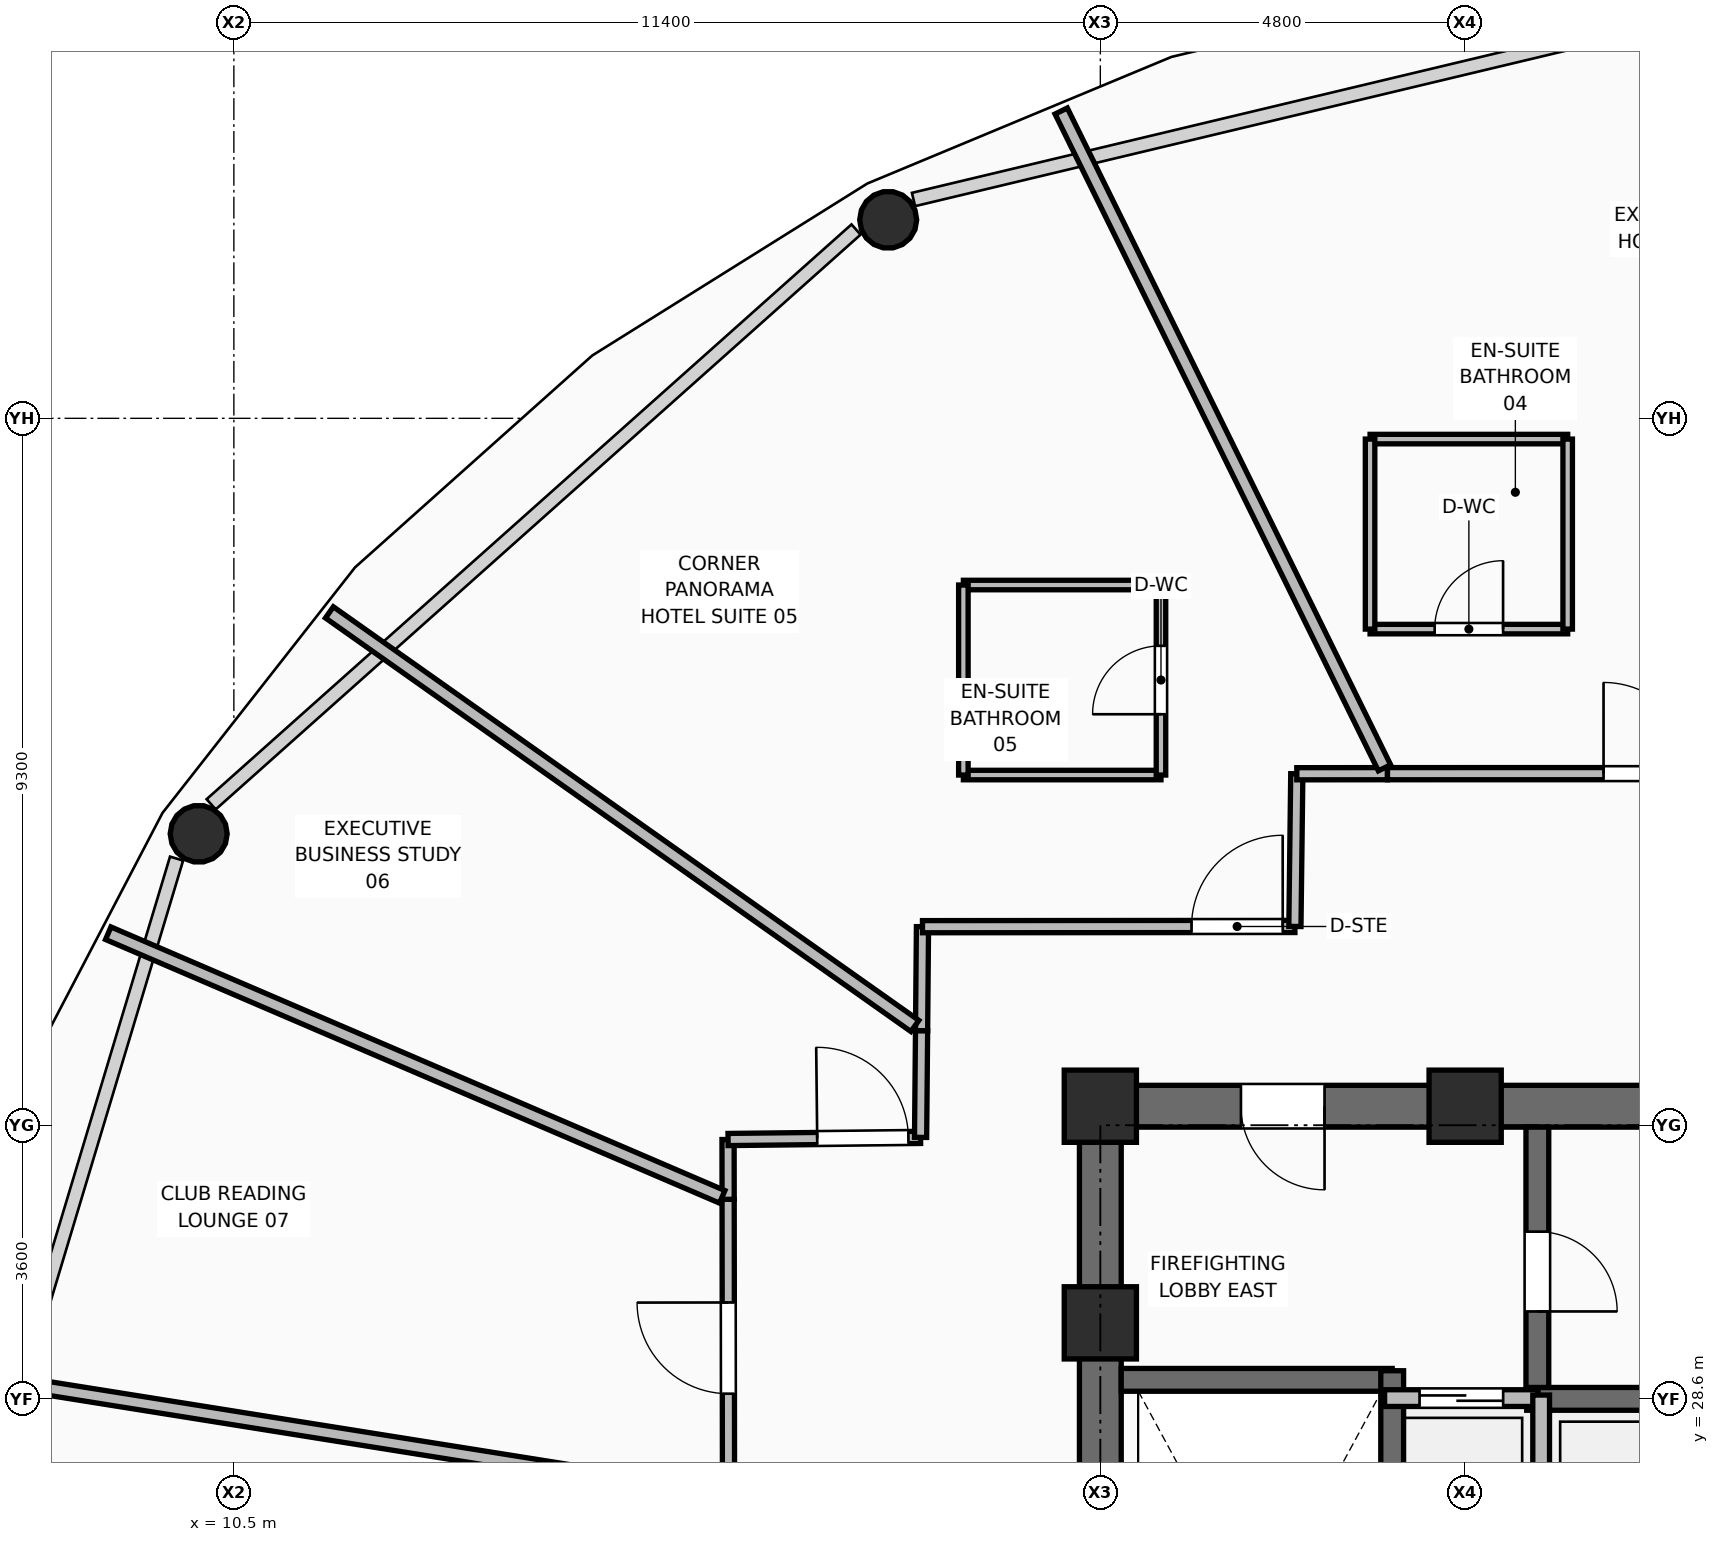
"""IFC4 building model, lengths in metres.
Left out: names, types, materials, properties, quantities, classifications, styles, units other than length and angle.
Written with IfcOpenShell. Run it as: python <this file> out.ifc"""

import sys

from ifc_helpers import new_model, si_unit, direction, frame, frame_2d, origin, origin_2d, place, context, subcontext, project, spatial, rectangle, hollow_circle, extrude, element, fill, save


model = new_model("IFC4")
c1 = context("Model", 3, precision=1e-05, world=origin(), true_north=direction((0.0, 1.0)))
c2 = subcontext(c1, "Body", "Model", "MODEL_VIEW")
j1 = project(units=[si_unit("LENGTHUNIT", "METRE"), si_unit("PLANEANGLEUNIT", "RADIAN")], contexts=[c1])
p1 = place(None, origin())
s1 = spatial("IfcSite", under=j1, at=p1, CompositionType="ELEMENT")
p2 = place(p1, origin())
s2 = spatial("IfcBuilding", under=s1, at=p2, CompositionType="ELEMENT")
p3 = place(p2, frame((0.0, 0.0, 157.2)))
s3 = spatial("IfcBuildingStorey", under=s2, at=p3, CompositionType="ELEMENT", Elevation=157.2)
for number, where, z_axis, x_axis in (
    (1, (21.9, 29.6, 0.0), (0.0, 0.0, 1.0), (1.0, 0.0, 0.0)),
    (2, (21.9, 32.45, 0.0), (0.0, 0.0, 1.0), (1.0, 0.0, 0.0)),
    (3, (26.7, 32.45, 0.0), (0.0, 0.0, 1.0), (1.0, 0.0, 0.0)),
):
    element("IfcColumn", number, at=place(p3, frame(where, z_axis=z_axis, x_axis=x_axis)), inside=s3, PredefinedType="COLUMN", context=c2, shape_type="SweptSolid", body=[
        extrude(rectangle(XDim=0.95, YDim=0.95, at=origin_2d()), origin(), (0.0, 0.0, 1.0), 3.75),
    ])
for number, where, z_axis, x_axis in (
    (4, (19.109, 44.112, 0.0), (0.0, 0.0, 1.0), (1.0, 0.0, 0.0)),
    (5, (10.037, 36.034, 0.0), (0.0, 0.0, 1.0), (1.0, 0.0, 0.0)),
):
    element("IfcColumn", number, at=place(p3, frame(where, z_axis=z_axis, x_axis=x_axis)), inside=s3, PredefinedType="COLUMN", context=c2, shape_type="SweptSolid", body=[
        extrude(hollow_circle(Radius=0.375, WallThickness=0.035, at=origin_2d()), origin(), (0.0, 0.0, 1.0), 3.57),
    ])
p4 = place(p3, frame((21.625, 32.45, 0.0), z_axis=(0.0, 0.0, 1.0), x_axis=(1.0, 0.0, 0.0)))
e6 = element("IfcWall", 6, at=p4, inside=s3, PredefinedType="SHEAR", context=c2, shape_type="SweptSolid", body=[
    extrude(rectangle(XDim=19.75, YDim=0.55, at=frame_2d((9.875, 0.0))), origin(), (0.0, 0.0, 1.0), 3.57),
])
p5 = place(p4, frame((2.125, 0.0, 0.0)))
e7 = element("IfcOpeningElement", 7, at=p5, cuts=e6, PredefinedType="OPENING", context=c2, shape_type="SweptSolid", body=[
    extrude(rectangle(XDim=1.1, YDim=2.1, at=frame_2d((0.55, 1.05))), frame((0.0, 0.285, 0.0), z_axis=(0.0, -1.0, 0.0), x_axis=(1.0, 0.0, 0.0)), (0.0, 0.0, 1.0), 0.57),
])
p6 = place(p4, frame((15.515, 0.0, 0.0)))
e8 = element("IfcOpeningElement", 8, at=p6, cuts=e6, PredefinedType="OPENING", context=c2, shape_type="SweptSolid", body=[
    extrude(rectangle(XDim=1.0, YDim=2.1, at=frame_2d((0.5, 1.05))), frame((0.0, 0.285, 0.0), z_axis=(0.0, -1.0, 0.0), x_axis=(1.0, 0.0, 0.0)), (0.0, 0.0, 1.0), 0.57),
])
p7 = place(p4, frame((17.525, 0.0, 0.0)))
e9 = element("IfcOpeningElement", 9, at=p7, cuts=e6, PredefinedType="OPENING", context=c2, shape_type="SweptSolid", body=[
    extrude(rectangle(XDim=0.9, YDim=2.1, at=frame_2d((0.45, 1.05))), frame((0.0, 0.285, 0.0), z_axis=(0.0, -1.0, 0.0), x_axis=(1.0, 0.0, 0.0)), (0.0, 0.0, 1.0), 0.57),
])
p8 = place(p3, frame((21.9, 18.075, 0.0), z_axis=(0.0, 0.0, 1.0), x_axis=(0.0, 1.0, 0.0)))
e10 = element("IfcWall", 10, at=p8, inside=s3, PredefinedType="SHEAR", context=c2, shape_type="SweptSolid", body=[
    extrude(rectangle(XDim=14.1, YDim=0.55, at=frame_2d((7.05, 0.0))), origin(), (0.0, 0.0, 1.0), 3.57),
])
p9 = place(p3, frame((22.175, 28.85, 0.0), z_axis=(0.0, 0.0, 1.0), x_axis=(1.0, 0.0, 0.0)))
e11 = element("IfcWall", 11, at=p9, inside=s3, PredefinedType="SHEAR", context=c2, shape_type="SweptSolid", body=[
    extrude(rectangle(XDim=3.565, YDim=0.3, at=frame_2d((1.782, 0.0))), origin(), (0.0, 0.0, 1.0), 3.57),
])
p10 = place(p3, frame((25.74, 20.98, 0.0), z_axis=(0.0, 0.0, 1.0), x_axis=(0.0, 1.0, 0.0)))
e12 = element("IfcWall", 12, at=p10, inside=s3, PredefinedType="SHEAR", context=c2, shape_type="SweptSolid", body=[
    extrude(rectangle(XDim=7.99, YDim=0.3, at=frame_2d((3.995, 0.0))), origin(), (0.0, 0.0, 1.0), 3.57),
])
p11 = place(p3, frame((27.51, 28.6, 0.0), z_axis=(0.0, 0.0, 1.0), x_axis=(1.0, 0.0, 0.0)))
e13 = element("IfcWall", 13, at=p11, inside=s3, PredefinedType="SHEAR", context=c2, shape_type="SweptSolid", body=[
    extrude(rectangle(XDim=8.03, YDim=0.3, at=frame_2d((4.015, 0.0))), origin(), (0.0, 0.0, 1.0), 3.57),
])
p12 = place(p3, frame((27.65, 28.75, 0.0), z_axis=(0.0, 0.0, 1.0), x_axis=(0.0, 1.0, 0.0)))
e14 = element("IfcWall", 14, at=p12, inside=s3, PredefinedType="SHEAR", context=c2, shape_type="SweptSolid", body=[
    extrude(rectangle(XDim=3.425, YDim=0.3, at=frame_2d((1.712, 0.0))), origin(), (0.0, 0.0, 1.0), 3.57),
])
p13 = place(p12, frame((1.0, 0.0, 0.0)))
e15 = element("IfcOpeningElement", 15, at=p13, cuts=e14, PredefinedType="OPENING", context=c2, shape_type="SweptSolid", body=[
    extrude(rectangle(XDim=1.05, YDim=2.1, at=frame_2d((0.525, 1.05))), frame((0.0, 0.16, 0.0), z_axis=(0.0, -1.0, 0.0), x_axis=(1.0, 0.0, 0.0)), (0.0, 0.0, 1.0), 0.32),
])
p14 = place(p3, frame((25.64, 28.61, 0.0), z_axis=(0.0, 0.0, 1.0), x_axis=(1.0, 0.0, 0.0)))
e16 = element("IfcWall", 16, at=p14, inside=s3, PredefinedType="PARTITIONING", context=c2, shape_type="SweptSolid", body=[
    extrude(rectangle(XDim=2.02, YDim=0.22, at=frame_2d((1.01, 0.0))), origin(), (0.0, 0.0, 1.0), 3.55),
])
p15 = place(p14, frame((0.46, 0.0, 0.0)))
e17 = element("IfcOpeningElement", 17, at=p15, cuts=e16, PredefinedType="OPENING", context=c2, shape_type="SweptSolid", body=[
    extrude(rectangle(XDim=1.1, YDim=2.2, at=frame_2d((0.55, 1.1))), frame((0.0, 0.12, 0.0), z_axis=(0.0, -1.0, 0.0), x_axis=(1.0, 0.0, 0.0)), (0.0, 0.0, 1.0), 0.24),
])
p16 = place(p3, frame((27.7, 25.65, 0.0), z_axis=(0.0, 0.0, 1.0), x_axis=(0.0, 1.0, 0.0)))
e18 = element("IfcWall", 18, at=p16, inside=s3, PredefinedType="PARTITIONING", context=c2, shape_type="SweptSolid", body=[
    extrude(rectangle(XDim=3.0, YDim=0.22, at=frame_2d((1.5, 0.0))), origin(), (0.0, 0.0, 1.0), 3.55),
])
p17 = place(p3, frame((17.008, 27.311, 0.0), z_axis=(0.0, 0.0, 1.0), x_axis=(-0.001309879116, 0.999999142108, 0.0)))
e19 = element("IfcWall", 19, at=p17, inside=s3, PredefinedType="PARTITIONING", context=c2, shape_type="SweptSolid", body=[
    extrude(rectangle(XDim=3.914, YDim=0.16, at=frame_2d((1.957, 0.0))), origin(), (0.0, 0.0, 1.0), 3.55),
])
p18 = place(p17, frame((1.357, 0.0, 0.0)))
e20 = element("IfcOpeningElement", 20, at=p18, cuts=e19, PredefinedType="OPENING", context=c2, shape_type="SweptSolid", body=[
    extrude(rectangle(XDim=1.2, YDim=2.1, at=frame_2d((0.6, 1.05))), frame((0.0, 0.09, 0.0), z_axis=(0.0, -1.0, 0.0), x_axis=(1.0, 0.0, 0.0)), (0.0, 0.0, 1.0), 0.18),
])
p19 = place(p3, frame((17.003, 31.225, 0.0), z_axis=(0.0, 0.0, 1.0), x_axis=(-0.001241078784, 0.999999229861, 0.0)))
e21 = element("IfcWall", 21, at=p19, inside=s3, PredefinedType="PARTITIONING", context=c2, shape_type="SweptSolid", body=[
    extrude(rectangle(XDim=0.787, YDim=0.16, at=frame_2d((0.394, 0.0))), origin(), (0.0, 0.0, 1.0), 3.55),
])
p20 = place(p3, frame((17.002, 32.012, 0.0), z_axis=(0.0, 0.0, 1.0), x_axis=(0.999938574393, 0.011083656487, 0.0)))
e22 = element("IfcWall", 22, at=p20, inside=s3, PredefinedType="PARTITIONING", context=c2, shape_type="SweptSolid", body=[
    extrude(rectangle(XDim=2.533, YDim=0.16, at=frame_2d((1.267, 0.0))), origin(), (0.0, 0.0, 1.0), 3.55),
])
p21 = place(p20, frame((1.173, 0.0, 0.0)))
e23 = element("IfcOpeningElement", 23, at=p21, cuts=e22, PredefinedType="OPENING", context=c2, shape_type="SweptSolid", body=[
    extrude(rectangle(XDim=1.2, YDim=2.1, at=frame_2d((0.6, 1.05))), frame((0.0, 0.09, 0.0), z_axis=(0.0, -1.0, 0.0), x_axis=(1.0, 0.0, 0.0)), (0.0, 0.0, 1.0), 0.18),
])
p22 = place(p3, frame((19.535, 32.04, 0.0), z_axis=(0.0, 0.0, 1.0), x_axis=(0.009389257464, 0.999955919951, 0.0)))
e24 = element("IfcWall", 24, at=p22, inside=s3, PredefinedType="PARTITIONING", context=c2, shape_type="SweptSolid", body=[
    extrude(rectangle(XDim=1.404, YDim=0.16, at=frame_2d((0.702, 0.0))), origin(), (0.0, 0.0, 1.0), 3.006),
])
p23 = place(p3, frame((19.548, 33.444, 0.0), z_axis=(0.0, 0.0, 1.0), x_axis=(0.008744980606, 0.999961761926, 0.0)))
e25 = element("IfcWall", 25, at=p23, inside=s3, PredefinedType="PARTITIONING", context=c2, shape_type="SweptSolid", body=[
    extrude(rectangle(XDim=1.368, YDim=0.16, at=frame_2d((0.684, 0.0))), origin(), (0.0, 0.0, 1.0), 3.55),
])
p24 = place(p3, frame((19.56, 34.812, 0.0), z_axis=(0.0, 0.0, 1.0), x_axis=(0.999999821253, 0.000597907217, 0.0)))
e26 = element("IfcWall", 26, at=p24, inside=s3, PredefinedType="PARTITIONING", context=c2, shape_type="SweptSolid", body=[
    extrude(rectangle(XDim=4.9, YDim=0.16, at=frame_2d((2.45, 0.0))), origin(), (0.0, 0.0, 1.0), 3.006),
])
p25 = place(p24, frame((3.54, 0.0, 0.0)))
e27 = element("IfcOpeningElement", 27, at=p25, cuts=e26, PredefinedType="OPENING", context=c2, shape_type="SweptSolid", body=[
    extrude(rectangle(XDim=1.2, YDim=2.1, at=frame_2d((0.6, 1.05))), frame((0.0, 0.09, 0.0), z_axis=(0.0, -1.0, 0.0), x_axis=(1.0, 0.0, 0.0)), (0.0, 0.0, 1.0), 0.18),
])
p26 = place(p3, frame((24.46, 34.815, 0.0), z_axis=(0.0, 0.0, 1.0), x_axis=(0.01251572883, 0.999921675199, 0.0)))
e28 = element("IfcWall", 28, at=p26, inside=s3, PredefinedType="PARTITIONING", context=c2, shape_type="SweptSolid", body=[
    extrude(rectangle(XDim=2.009, YDim=0.16, at=frame_2d((1.005, 0.0))), origin(), (0.0, 0.0, 1.0), 3.55),
])
p27 = place(p3, frame((24.485, 36.824, 0.0), z_axis=(0.0, 0.0, 1.0), x_axis=(0.999999664894, 0.000818665301, 0.0)))
e29 = element("IfcWall", 29, at=p27, inside=s3, PredefinedType="PARTITIONING", context=c2, shape_type="SweptSolid", body=[
    extrude(rectangle(XDim=1.193, YDim=0.16, at=frame_2d((0.596, 0.0))), origin(), (0.0, 0.0, 1.0), 3.55),
])
p28 = place(p3, frame((25.678, 36.825, 0.0), z_axis=(0.0, 0.0, 1.0), x_axis=(0.999999989491, 0.000144974809, 0.0)))
e30 = element("IfcWall", 30, at=p28, inside=s3, PredefinedType="PARTITIONING", context=c2, shape_type="SweptSolid", body=[
    extrude(rectangle(XDim=6.736, YDim=0.16, at=frame_2d((3.368, 0.0))), origin(), (0.0, 0.0, 1.0), 3.006),
])
p29 = place(p28, frame((2.843, 0.0, 0.0)))
e31 = element("IfcOpeningElement", 31, at=p29, cuts=e30, PredefinedType="OPENING", context=c2, shape_type="SweptSolid", body=[
    extrude(rectangle(XDim=1.2, YDim=2.1, at=frame_2d((0.6, 1.05))), frame((0.0, 0.09, 0.0), z_axis=(0.0, -1.0, 0.0), x_axis=(1.0, 0.0, 0.0)), (0.0, 0.0, 1.0), 0.18),
])
p30 = place(p3, frame((25.639, 36.902, 0.0), z_axis=(0.0, 0.0, 1.0), x_axis=(-0.44167900267, 0.897173148617, 0.0)))
e32 = element("IfcWall", 32, at=p30, inside=s3, PredefinedType="PARTITIONING", context=c2, shape_type="SweptSolid", body=[
    extrude(rectangle(XDim=9.631, YDim=0.18, at=frame_2d((4.815, 0.0))), origin(), (0.0, 0.0, 1.0), 2.852),
])
p31 = place(p3, frame((19.46, 33.506, 0.0), z_axis=(0.0, 0.0, 1.0), x_axis=(-0.816788462003, 0.576937265513, 0.0)))
e33 = element("IfcWall", 33, at=p31, inside=s3, PredefinedType="PARTITIONING", context=c2, shape_type="SweptSolid", body=[
    extrude(rectangle(XDim=9.431, YDim=0.18, at=frame_2d((4.715, 0.0))), origin(), (0.0, 0.0, 1.0), 2.852),
])
p32 = place(p3, frame((16.925, 31.258, 0.0), z_axis=(0.0, 0.0, 1.0), x_axis=(-0.918899218309, 0.394492365694, 0.0)))
e34 = element("IfcWall", 34, at=p32, inside=s3, PredefinedType="PARTITIONING", context=c2, shape_type="SweptSolid", body=[
    extrude(rectangle(XDim=8.791, YDim=0.18, at=frame_2d((4.396, 0.0))), origin(), (0.0, 0.0, 1.0), 2.852),
])
p33 = place(p3, frame((16.925, 27.324, 0.0), z_axis=(0.0, 0.0, 1.0), x_axis=(-0.987522476436, 0.157478120811, 0.0)))
e35 = element("IfcWall", 35, at=p33, inside=s3, PredefinedType="PARTITIONING", context=c2, shape_type="SweptSolid", body=[
    extrude(rectangle(XDim=10.389, YDim=0.18, at=frame_2d((5.194, 0.0))), origin(), (0.0, 0.0, 1.0), 2.852),
])
p34 = place(p3, frame((25.449, 38.727, 0.0), z_axis=(0.0, 0.0, 1.0), x_axis=(1.0, 0.0, 0.0)))
e36 = element("IfcWall", 36, at=p34, inside=s3, PredefinedType="PARTITIONING", context=c2, shape_type="SweptSolid", body=[
    extrude(rectangle(XDim=2.6, YDim=0.125, at=frame_2d((1.3, 0.0))), origin(), (0.0, 0.0, 1.0), 3.55),
])
p35 = place(p34, frame((0.85, 0.0, 0.0)))
e37 = element("IfcOpeningElement", 37, at=p35, cuts=e36, PredefinedType="OPENING", context=c2, shape_type="SweptSolid", body=[
    extrude(rectangle(XDim=0.9, YDim=2.1, at=frame_2d((0.45, 1.05))), frame((0.0, 0.073, 0.0), z_axis=(0.0, -1.0, 0.0), x_axis=(1.0, 0.0, 0.0)), (0.0, 0.0, 1.0), 0.145),
])
p36 = place(p3, frame((25.449, 41.227, 0.0), z_axis=(0.0, 0.0, 1.0), x_axis=(1.0, 0.0, 0.0)))
e38 = element("IfcWall", 38, at=p36, inside=s3, PredefinedType="PARTITIONING", context=c2, shape_type="SweptSolid", body=[
    extrude(rectangle(XDim=2.6, YDim=0.125, at=frame_2d((1.3, 0.0))), origin(), (0.0, 0.0, 1.0), 3.55),
])
for number, where, z_axis, x_axis in (
    (39, (25.449, 38.727, 0.0), (0.0, 0.0, 1.0), (0.0, 1.0, 0.0)),
    (40, (28.049, 38.727, 0.0), (0.0, 0.0, 1.0), (0.0, 1.0, 0.0)),
):
    element("IfcWall", number, at=place(p3, frame(where, z_axis=z_axis, x_axis=x_axis)), inside=s3, PredefinedType="PARTITIONING", context=c2, shape_type="SweptSolid", body=[
        extrude(rectangle(XDim=2.5, YDim=0.125, at=frame_2d((1.25, 0.0))), origin(), (0.0, 0.0, 1.0), 3.55),
    ])
for number, where, z_axis, x_axis in (
    (41, (20.098, 36.807, 0.0), (0.0, 0.0, 1.0), (1.0, 0.0, 0.0)),
    (42, (20.098, 39.307, 0.0), (0.0, 0.0, 1.0), (1.0, 0.0, 0.0)),
):
    element("IfcWall", number, at=place(p3, frame(where, z_axis=z_axis, x_axis=x_axis)), inside=s3, PredefinedType="PARTITIONING", context=c2, shape_type="SweptSolid", body=[
        extrude(rectangle(XDim=2.6, YDim=0.125, at=frame_2d((1.3, 0.0))), origin(), (0.0, 0.0, 1.0), 3.006),
    ])
p37 = place(p3, frame((20.098, 36.807, 0.0), z_axis=(0.0, 0.0, 1.0), x_axis=(0.0, 1.0, 0.0)))
e43 = element("IfcWall", 43, at=p37, inside=s3, PredefinedType="PARTITIONING", context=c2, shape_type="SweptSolid", body=[
    extrude(rectangle(XDim=2.5, YDim=0.125, at=frame_2d((1.25, 0.0))), origin(), (0.0, 0.0, 1.0), 3.006),
])
p38 = place(p3, frame((22.698, 36.807, 0.0), z_axis=(0.0, 0.0, 1.0), x_axis=(0.0, 1.0, 0.0)))
e44 = element("IfcWall", 44, at=p38, inside=s3, PredefinedType="PARTITIONING", context=c2, shape_type="SweptSolid", body=[
    extrude(rectangle(XDim=2.5, YDim=0.125, at=frame_2d((1.25, 0.0))), origin(), (0.0, 0.0, 1.0), 3.55),
])
p39 = place(p38, frame((0.8, 0.0, 0.0)))
e45 = element("IfcOpeningElement", 45, at=p39, cuts=e44, PredefinedType="OPENING", context=c2, shape_type="SweptSolid", body=[
    extrude(rectangle(XDim=0.9, YDim=2.1, at=frame_2d((0.45, 1.05))), frame((0.0, 0.073, 0.0), z_axis=(0.0, -1.0, 0.0), x_axis=(1.0, 0.0, 0.0)), (0.0, 0.0, 1.0), 0.145),
])
p40 = place(p13, frame((1.05, 0.0, 0.0), z_axis=(0.0, 0.0, 1.0), x_axis=(-1.0, 0.0, 0.0)))
e46 = element("IfcDoor", 46, at=p40, inside=s3, OperationType="SINGLE_SWING_RIGHT", PredefinedType="DOOR", context=c2, shape_type="SweptSolid", body=[
    extrude(rectangle(XDim=1.05, YDim=2.1, at=frame_2d((0.525, 1.05))), frame((0.0, 0.025, 0.0), z_axis=(0.0, -1.0, 0.0), x_axis=(1.0, 0.0, 0.0)), (0.0, 0.0, 1.0), 0.05),
])
fill(e15, e46)
p41 = place(p15, origin())
e47 = element("IfcDoor", 47, at=p41, inside=s3, OperationType="DOUBLE_DOOR_SLIDING", PredefinedType="DOOR", context=c2, shape_type="SweptSolid", body=[
    extrude(rectangle(XDim=1.1, YDim=2.2, at=frame_2d((0.55, 1.1))), frame((0.0, 0.025, 0.0), z_axis=(0.0, -1.0, 0.0), x_axis=(1.0, 0.0, 0.0)), (0.0, 0.0, 1.0), 0.05),
])
fill(e17, e47)
p42 = place(p5, frame((1.1, 0.0, 0.0), z_axis=(0.0, 0.0, 1.0), x_axis=(-1.0, 0.0, 0.0)))
e48 = element("IfcDoor", 48, at=p42, inside=s3, OperationType="SINGLE_SWING_LEFT", PredefinedType="DOOR", context=c2, shape_type="SweptSolid", body=[
    extrude(rectangle(XDim=1.1, YDim=2.1, at=frame_2d((0.55, 1.05))), frame((0.0, 0.025, 0.0), z_axis=(0.0, -1.0, 0.0), x_axis=(1.0, 0.0, 0.0)), (0.0, 0.0, 1.0), 0.05),
])
fill(e7, e48)
p43 = place(p35, origin())
e49 = element("IfcDoor", 49, at=p43, inside=s3, OperationType="SINGLE_SWING_RIGHT", PredefinedType="DOOR", context=c2, shape_type="SweptSolid", body=[
    extrude(rectangle(XDim=0.9, YDim=2.1, at=frame_2d((0.45, 1.05))), frame((0.0, 0.025, 0.0), z_axis=(0.0, -1.0, 0.0), x_axis=(1.0, 0.0, 0.0)), (0.0, 0.0, 1.0), 0.05),
])
fill(e37, e49)
p44 = place(p29, origin())
e50 = element("IfcDoor", 50, at=p44, inside=s3, OperationType="SINGLE_SWING_LEFT", PredefinedType="DOOR", context=c2, shape_type="SweptSolid", body=[
    extrude(rectangle(XDim=1.2, YDim=2.1, at=frame_2d((0.6, 1.05))), frame((0.0, 0.025, 0.0), z_axis=(0.0, -1.0, 0.0), x_axis=(1.0, 0.0, 0.0)), (0.0, 0.0, 1.0), 0.05),
])
fill(e31, e50)
p45 = place(p39, origin())
e51 = element("IfcDoor", 51, at=p45, inside=s3, OperationType="SINGLE_SWING_LEFT", PredefinedType="DOOR", context=c2, shape_type="SweptSolid", body=[
    extrude(rectangle(XDim=0.9, YDim=2.1, at=frame_2d((0.45, 1.05))), frame((0.0, 0.025, 0.0), z_axis=(0.0, -1.0, 0.0), x_axis=(1.0, 0.0, 0.0)), (0.0, 0.0, 1.0), 0.05),
])
fill(e45, e51)
p46 = place(p25, origin())
e52 = element("IfcDoor", 52, at=p46, inside=s3, OperationType="SINGLE_SWING_RIGHT", PredefinedType="DOOR", context=c2, shape_type="SweptSolid", body=[
    extrude(rectangle(XDim=1.2, YDim=2.1, at=frame_2d((0.6, 1.05))), frame((0.0, 0.025, 0.0), z_axis=(0.0, -1.0, 0.0), x_axis=(1.0, 0.0, 0.0)), (0.0, 0.0, 1.0), 0.05),
])
fill(e27, e52)
p47 = place(p21, origin())
e53 = element("IfcDoor", 53, at=p47, inside=s3, OperationType="SINGLE_SWING_LEFT", PredefinedType="DOOR", context=c2, shape_type="SweptSolid", body=[
    extrude(rectangle(XDim=1.2, YDim=2.1, at=frame_2d((0.6, 1.05))), frame((0.0, 0.025, 0.0), z_axis=(0.0, -1.0, 0.0), x_axis=(1.0, 0.0, 0.0)), (0.0, 0.0, 1.0), 0.05),
])
fill(e23, e53)
p48 = place(p18, origin())
e54 = element("IfcDoor", 54, at=p48, inside=s3, OperationType="SINGLE_SWING_RIGHT", PredefinedType="DOOR", context=c2, shape_type="SweptSolid", body=[
    extrude(rectangle(XDim=1.2, YDim=2.1, at=frame_2d((0.6, 1.05))), frame((0.0, 0.025, 0.0), z_axis=(0.0, -1.0, 0.0), x_axis=(1.0, 0.0, 0.0)), (0.0, 0.0, 1.0), 0.05),
])
fill(e20, e54)
save(model, sys.argv[1])
